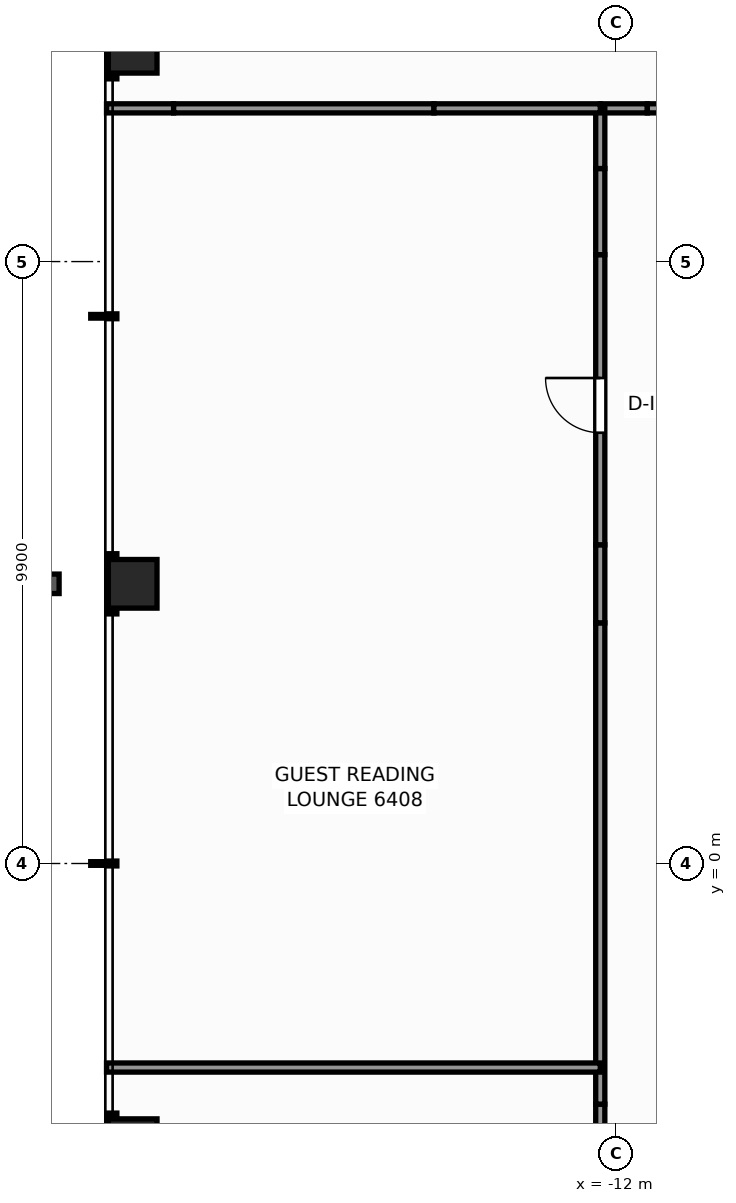
"""IFC4 building model, lengths in metres.
Left out: names, types, materials, properties, quantities, classifications, styles, units other than length and angle.
Written with IfcOpenShell. Run it as: python <this file> out.ifc"""

import sys

from ifc_helpers import new_model, si_unit, direction, frame, frame_2d, origin, origin_2d, place, context, subcontext, project, spatial, rectangle, extrude, element, fill, save


model = new_model("IFC4")
c1 = context("Model", 3, precision=1e-05, world=origin(), true_north=direction((0.0, 1.0)))
c2 = subcontext(c1, "Body", "Model", "MODEL_VIEW")
j1 = project(units=[si_unit("LENGTHUNIT", "METRE"), si_unit("PLANEANGLEUNIT", "RADIAN")], contexts=[c1])
p1 = place(None, origin())
s1 = spatial("IfcSite", under=j1, at=p1, CompositionType="ELEMENT")
p2 = place(p1, origin())
s2 = spatial("IfcBuilding", under=s1, at=p2, CompositionType="ELEMENT")
p3 = place(p2, frame((0.0, 0.0, 219.6)))
s3 = spatial("IfcBuildingStorey", under=s2, at=p3, CompositionType="ELEMENT", Elevation=219.6)
for number, where, z_axis, x_axis in (
    (1, (-19.95, -4.6, 0.0), (0.0, 0.0, 1.0), (1.0, 0.0, 0.0)),
    (2, (-19.95, 4.6, 0.0), (0.0, 0.0, 1.0), (1.0, 0.0, 0.0)),
    (3, (-19.95, 13.4, 0.0), (0.0, 0.0, 1.0), (1.0, 0.0, 0.0)),
):
    element("IfcColumn", number, at=place(p3, frame(where, z_axis=z_axis, x_axis=x_axis)), inside=s3, PredefinedType="COLUMN", context=c2, shape_type="SweptSolid", body=[
        extrude(rectangle(XDim=0.8, YDim=0.8, at=origin_2d()), origin(), (0.0, 0.0, 1.0), 3.3),
    ])
p4 = place(p3, frame((-12.26, 12.42, 0.0), z_axis=(0.0, 0.0, 1.0), x_axis=(1.0, 0.0, 0.0)))
e4 = element("IfcWall", 4, at=p4, inside=s3, PredefinedType="PARTITIONING", context=c2, shape_type="SweptSolid", body=[
    extrude(rectangle(XDim=0.774, YDim=0.15, at=frame_2d((0.387, 0.0))), origin(), (0.0, 0.0, 1.0), 3.08),
])
p5 = place(p3, frame((-11.486, 12.42, 0.0), z_axis=(0.0, 0.0, 1.0), x_axis=(1.0, 0.0, 0.0)))
e5 = element("IfcWall", 5, at=p5, inside=s3, PredefinedType="PARTITIONING", context=c2, shape_type="SweptSolid", body=[
    extrude(rectangle(XDim=1.417, YDim=0.15, at=frame_2d((0.708, 0.0))), origin(), (0.0, 0.0, 1.0), 1.265),
])
p6 = place(p3, frame((-12.26, -5.242, 0.0), z_axis=(0.0, 0.0, 1.0), x_axis=(0.0, 1.0, 0.0)))
e6 = element("IfcWall", 6, at=p6, inside=s3, PredefinedType="PARTITIONING", context=c2, shape_type="SweptSolid", body=[
    extrude(rectangle(XDim=1.284, YDim=0.15, at=frame_2d((0.642, 0.0))), origin(), (0.0, 0.0, 1.0), 1.265),
])
p7 = place(p3, frame((-12.26, -3.958, 0.0), z_axis=(0.0, 0.0, 1.0), x_axis=(0.0, 1.0, 0.0)))
e7 = element("IfcWall", 7, at=p7, inside=s3, PredefinedType="PARTITIONING", context=c2, shape_type="SweptSolid", body=[
    extrude(rectangle(XDim=7.916, YDim=0.15, at=frame_2d((3.958, 0.0))), origin(), (0.0, 0.0, 1.0), 2.369),
])
p8 = place(p3, frame((-12.26, 3.958, 0.0), z_axis=(0.0, 0.0, 1.0), x_axis=(0.0, 1.0, 0.0)))
e8 = element("IfcWall", 8, at=p8, inside=s3, PredefinedType="PARTITIONING", context=c2, shape_type="SweptSolid", body=[
    extrude(rectangle(XDim=1.284, YDim=0.15, at=frame_2d((0.642, 0.0))), origin(), (0.0, 0.0, 1.0), 1.265),
])
p9 = place(p3, frame((-12.26, 5.242, 0.0), z_axis=(0.0, 0.0, 1.0), x_axis=(0.0, 1.0, 0.0)))
e9 = element("IfcWall", 9, at=p9, inside=s3, PredefinedType="PARTITIONING", context=c2, shape_type="SweptSolid", body=[
    extrude(rectangle(XDim=4.772, YDim=0.15, at=frame_2d((2.386, 0.0))), origin(), (0.0, 0.0, 1.0), 3.08),
])
p10 = place(p9, frame((1.843, 0.0, 0.0)))
e10 = element("IfcOpeningElement", 10, at=p10, cuts=e9, PredefinedType="OPENING", context=c2, shape_type="SweptSolid", body=[
    extrude(rectangle(XDim=0.9, YDim=2.06, at=frame_2d((0.45, 1.03))), frame((0.0, 0.085, 0.0), z_axis=(0.0, -1.0, 0.0), x_axis=(1.0, 0.0, 0.0)), (0.0, 0.0, 1.0), 0.17),
])
p11 = place(p3, frame((-12.26, 10.014, 0.0), z_axis=(0.0, 0.0, 1.0), x_axis=(0.0, 1.0, 0.0)))
e11 = element("IfcWall", 11, at=p11, inside=s3, PredefinedType="PARTITIONING", context=c2, shape_type="SweptSolid", body=[
    extrude(rectangle(XDim=1.417, YDim=0.15, at=frame_2d((0.708, 0.0))), origin(), (0.0, 0.0, 1.0), 1.265),
])
p12 = place(p3, frame((-12.26, 11.43, 0.0), z_axis=(0.0, 0.0, 1.0), x_axis=(0.0, 1.0, 0.0)))
e12 = element("IfcWall", 12, at=p12, inside=s3, PredefinedType="PARTITIONING", context=c2, shape_type="SweptSolid", body=[
    extrude(rectangle(XDim=0.99, YDim=0.15, at=frame_2d((0.495, 0.0))), origin(), (0.0, 0.0, 1.0), 3.08),
])
p13 = place(p3, frame((-20.38, 12.42, 0.0), z_axis=(0.0, 0.0, 1.0), x_axis=(1.0, 0.0, 0.0)))
e13 = element("IfcWall", 13, at=p13, inside=s3, PredefinedType="PARTITIONING", context=c2, shape_type="SweptSolid", body=[
    extrude(rectangle(XDim=1.103, YDim=0.15, at=frame_2d((0.552, 0.0))), origin(), (0.0, 0.0, 1.0), 2.453),
])
p14 = place(p3, frame((-19.277, 12.42, 0.0), z_axis=(0.0, 0.0, 1.0), x_axis=(1.0, 0.0, 0.0)))
e14 = element("IfcWall", 14, at=p14, inside=s3, PredefinedType="PARTITIONING", context=c2, shape_type="SweptSolid", body=[
    extrude(rectangle(XDim=4.281, YDim=0.15, at=frame_2d((2.141, 0.0))), origin(), (0.0, 0.0, 1.0), 1.265),
])
p15 = place(p3, frame((-14.995, 12.42, 0.0), z_axis=(0.0, 0.0, 1.0), x_axis=(1.0, 0.0, 0.0)))
e15 = element("IfcWall", 15, at=p15, inside=s3, PredefinedType="PARTITIONING", context=c2, shape_type="SweptSolid", body=[
    extrude(rectangle(XDim=2.735, YDim=0.15, at=frame_2d((1.368, 0.0))), origin(), (0.0, 0.0, 1.0), 3.08),
])
p16 = place(p3, frame((-20.38, -3.356, 0.0), z_axis=(0.0, 0.0, 1.0), x_axis=(1.0, 0.0, 0.0)))
e16 = element("IfcWall", 16, at=p16, inside=s3, PredefinedType="PARTITIONING", context=c2, shape_type="SweptSolid", body=[
    extrude(rectangle(XDim=8.12, YDim=0.15, at=frame_2d((4.06, 0.0))), origin(), (0.0, 0.0, 1.0), 2.369),
])
p17 = place(p10, origin())
e17 = element("IfcDoor", 17, at=p17, inside=s3, OperationType="SINGLE_SWING_RIGHT", PredefinedType="DOOR", context=c2, shape_type="SweptSolid", body=[
    extrude(rectangle(XDim=0.9, YDim=2.06, at=frame_2d((0.45, 1.03))), frame((0.0, 0.025, 0.0), z_axis=(0.0, -1.0, 0.0), x_axis=(1.0, 0.0, 0.0)), (0.0, 0.0, 1.0), 0.05),
])
fill(e10, e17)
save(model, sys.argv[1])
